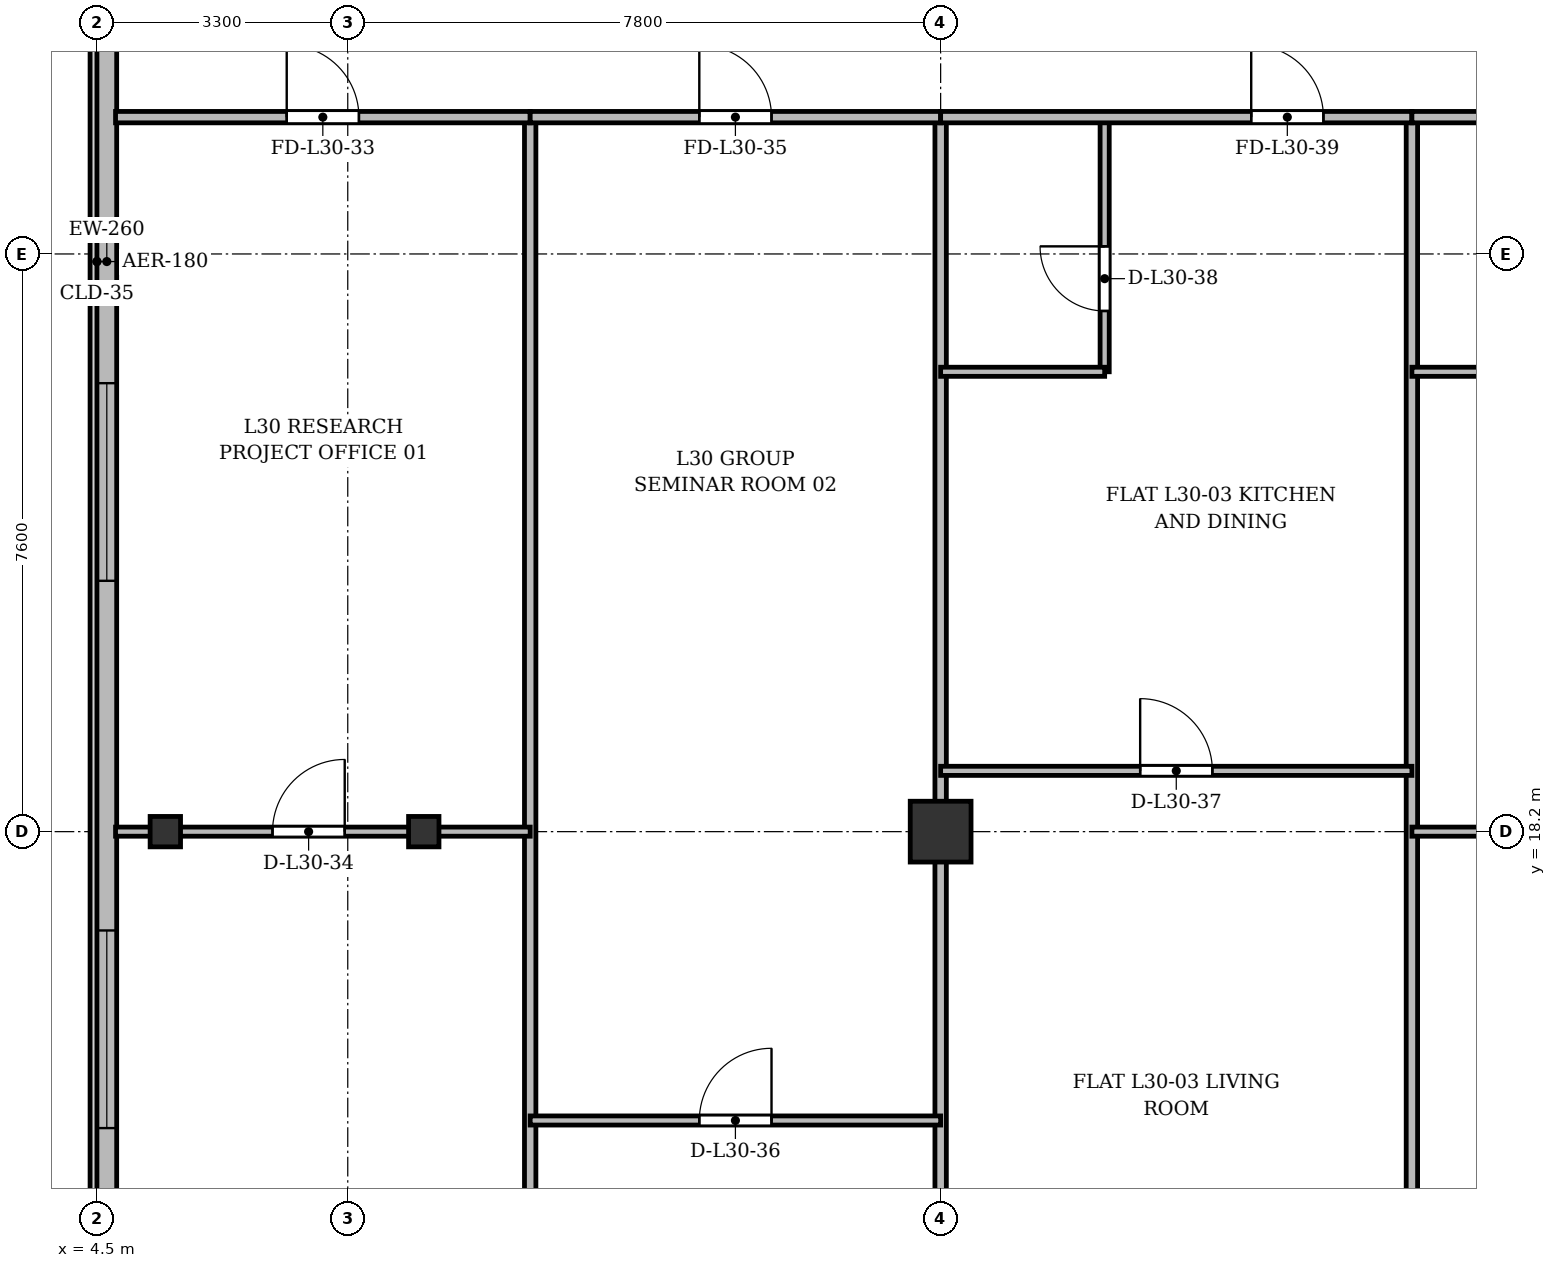
"""IFC4 building model, lengths in metres.
Left out: names, types, materials, properties, quantities, classifications, styles, units other than length and angle.
Written with IfcOpenShell. Run it as: python <this file> out.ifc"""

import sys

from ifc_helpers import new_model, si_unit, direction, frame, frame_2d, origin, origin_2d, place, context, subcontext, project, spatial, rectangle, i_section, extrude, source, transform, mapped, element, fill, save


model = new_model("IFC4")
c1 = context("Model", 3, precision=1e-05, world=origin(), true_north=direction((0.0, 1.0)))
c2 = subcontext(c1, "Body", "Model", "MODEL_VIEW")
j1 = project(units=[si_unit("LENGTHUNIT", "METRE"), si_unit("PLANEANGLEUNIT", "RADIAN")], contexts=[c1])
p1 = place(None, origin())
s1 = spatial("IfcSite", under=j1, at=p1, CompositionType="ELEMENT")
p2 = place(p1, origin())
s2 = spatial("IfcBuilding", under=s1, at=p2, CompositionType="ELEMENT")
p3 = place(p2, frame((0.0, 0.0, 117.7)))
s3 = spatial("IfcBuildingStorey", under=s2, at=p3, CompositionType="ELEMENT", Elevation=117.7)
m1 = source(origin(), c2, "Body", "SweptSolid", [
    extrude(i_section(OverallWidth=0.4, OverallDepth=0.4, WebThickness=0.022, FlangeThickness=0.035, at=origin_2d()), origin(), (0.0, 0.0, 1.0), 3.6),
])
for number, where, z_axis, x_axis in (
    (1, (5.4, 18.2, 0.0), (0.0, 0.0, 1.0), (1.0, 0.0, 0.0)),
    (2, (8.8, 18.2, 0.0), (0.0, 0.0, 1.0), (1.0, 0.0, 0.0)),
):
    element("IfcColumn", number, at=place(p3, frame(where, z_axis=z_axis, x_axis=x_axis)), inside=s3, PredefinedType="COLUMN", context=c2, shape_type="MappedRepresentation", body=[
        mapped(m1, transform((0.0, 0.0, 0.0), x_axis=(1.0, 0.0, 0.0), y_axis=(0.0, 1.0, 0.0), z_axis=(0.0, 0.0, 1.0), scale=1.0)),
    ])
m2 = source(origin(), c2, "Body", "SweptSolid", [
    extrude(rectangle(XDim=0.8, YDim=0.8, at=origin_2d()), origin(), (0.0, 0.0, 1.0), 3.6),
])
p4 = place(p3, frame((15.6, 18.2, 0.0), z_axis=(0.0, 0.0, 1.0), x_axis=(1.0, 0.0, 0.0)))
e3 = element("IfcColumn", 3, at=p4, inside=s3, PredefinedType="COLUMN", context=c2, shape_type="MappedRepresentation", body=[
    mapped(m2, transform((0.0, 0.0, 0.0), x_axis=(1.0, 0.0, 0.0), y_axis=(0.0, 1.0, 0.0), z_axis=(0.0, 0.0, 1.0), scale=1.0)),
])
p5 = place(p3, frame((4.63, 5.9, 0.0), z_axis=(0.0, 0.0, 1.0), x_axis=(0.0, 1.0, 0.0)))
e4 = element("IfcWall", 4, at=p5, inside=s3, PredefinedType="SOLIDWALL", context=c2, shape_type="SweptSolid", body=[
    extrude(rectangle(XDim=39.6, YDim=0.26, at=frame_2d((19.8, 0.0))), origin(), (0.0, 0.0, 1.0), 3.34),
])
p6 = place(p5, frame((1.45, 0.0, 0.92)))
e5 = element("IfcOpeningElement", 5, at=p6, cuts=e4, PredefinedType="OPENING", context=c2, shape_type="SweptSolid", body=[
    extrude(rectangle(XDim=1.2, YDim=1.65, at=frame_2d((0.6, 0.825))), frame((0.0, 0.14, 0.0), z_axis=(0.0, -1.0, 0.0), x_axis=(1.0, 0.0, 0.0)), (0.0, 0.0, 1.0), 0.28),
])
p7 = place(p5, frame((4.2, 0.0, 0.92)))
e6 = element("IfcOpeningElement", 6, at=p7, cuts=e4, PredefinedType="OPENING", context=c2, shape_type="SweptSolid", body=[
    extrude(rectangle(XDim=2.6, YDim=1.9, at=frame_2d((1.3, 0.95))), frame((0.0, 0.14, 0.0), z_axis=(0.0, -1.0, 0.0), x_axis=(1.0, 0.0, 0.0)), (0.0, 0.0, 1.0), 0.28),
])
p8 = place(p5, frame((8.4, 0.0, 0.92)))
e7 = element("IfcOpeningElement", 7, at=p8, cuts=e4, PredefinedType="OPENING", context=c2, shape_type="SweptSolid", body=[
    extrude(rectangle(XDim=2.6, YDim=1.9, at=frame_2d((1.3, 0.95))), frame((0.0, 0.14, 0.0), z_axis=(0.0, -1.0, 0.0), x_axis=(1.0, 0.0, 0.0)), (0.0, 0.0, 1.0), 0.28),
])
p9 = place(p5, frame((15.6, 0.0, 0.92)))
e8 = element("IfcOpeningElement", 8, at=p9, cuts=e4, PredefinedType="OPENING", context=c2, shape_type="SweptSolid", body=[
    extrude(rectangle(XDim=2.6, YDim=1.9, at=frame_2d((1.3, 0.95))), frame((0.0, 0.14, 0.0), z_axis=(0.0, -1.0, 0.0), x_axis=(1.0, 0.0, 0.0)), (0.0, 0.0, 1.0), 0.28),
])
p10 = place(p5, frame((33.9, 0.0, 0.92)))
e9 = element("IfcOpeningElement", 9, at=p10, cuts=e4, PredefinedType="OPENING", context=c2, shape_type="SweptSolid", body=[
    extrude(rectangle(XDim=1.2, YDim=1.65, at=frame_2d((0.6, 0.825))), frame((0.0, 0.14, 0.0), z_axis=(0.0, -1.0, 0.0), x_axis=(1.0, 0.0, 0.0)), (0.0, 0.0, 1.0), 0.28),
])
p11 = place(p5, frame((37.25, 0.0, 0.92)))
e10 = element("IfcOpeningElement", 10, at=p11, cuts=e4, PredefinedType="OPENING", context=c2, shape_type="SweptSolid", body=[
    extrude(rectangle(XDim=1.2, YDim=1.65, at=frame_2d((0.6, 0.825))), frame((0.0, 0.14, 0.0), z_axis=(0.0, -1.0, 0.0), x_axis=(1.0, 0.0, 0.0)), (0.0, 0.0, 1.0), 0.28),
])
p12 = place(p3, frame((10.2, 3.145, 0.0), z_axis=(0.0, 0.0, 1.0), x_axis=(0.0, 1.0, 0.0)))
e11 = element("IfcWall", 11, at=p12, inside=s3, PredefinedType="PARTITIONING", context=c2, shape_type="SweptSolid", body=[
    extrude(rectangle(XDim=24.455, YDim=0.15, at=frame_2d((12.228, 0.0))), origin(), (0.0, 0.0, 1.0), 2.752),
])
p13 = place(p3, frame((15.6, 3.145, 0.0), z_axis=(0.0, 0.0, 1.0), x_axis=(0.0, 1.0, 0.0)))
e12 = element("IfcWall", 12, at=p13, inside=s3, PredefinedType="PARTITIONING", context=c2, shape_type="SweptSolid", body=[
    extrude(rectangle(XDim=24.455, YDim=0.15, at=frame_2d((12.228, 0.0))), origin(), (0.0, 0.0, 1.0), 2.84),
])
p14 = place(p3, frame((21.8, 3.145, 0.0), z_axis=(0.0, 0.0, 1.0), x_axis=(0.0, 1.0, 0.0)))
e13 = element("IfcWall", 13, at=p14, inside=s3, PredefinedType="PARTITIONING", context=c2, shape_type="SweptSolid", body=[
    extrude(rectangle(XDim=24.455, YDim=0.15, at=frame_2d((12.228, 0.0))), origin(), (0.0, 0.0, 1.0), 2.752),
])
p15 = place(p3, frame((4.745, 27.6, 0.0), z_axis=(0.0, 0.0, 1.0), x_axis=(1.0, 0.0, 0.0)))
e14 = element("IfcWall", 14, at=p15, inside=s3, PredefinedType="PARTITIONING", context=c2, shape_type="SweptSolid", body=[
    extrude(rectangle(XDim=5.455, YDim=0.15, at=frame_2d((2.728, 0.0))), origin(), (0.0, 0.0, 1.0), 2.84),
])
p16 = place(p15, frame((2.252, 0.0, 0.0)))
e15 = element("IfcOpeningElement", 15, at=p16, cuts=e14, PredefinedType="OPENING", context=c2, shape_type="SweptSolid", body=[
    extrude(rectangle(XDim=0.95, YDim=2.15, at=frame_2d((0.475, 1.075))), frame((0.0, 0.085, 0.0), z_axis=(0.0, -1.0, 0.0), x_axis=(1.0, 0.0, 0.0)), (0.0, 0.0, 1.0), 0.17),
])
p17 = place(p3, frame((4.745, 18.2, 0.0), z_axis=(0.0, 0.0, 1.0), x_axis=(1.0, 0.0, 0.0)))
e16 = element("IfcWall", 16, at=p17, inside=s3, PredefinedType="PARTITIONING", context=c2, shape_type="SweptSolid", body=[
    extrude(rectangle(XDim=5.455, YDim=0.12, at=frame_2d((2.728, 0.0))), origin(), (0.0, 0.0, 1.0), 2.752),
])
p18 = place(p17, frame((2.065, 0.0, 0.0)))
e17 = element("IfcOpeningElement", 17, at=p18, cuts=e16, PredefinedType="OPENING", context=c2, shape_type="SweptSolid", body=[
    extrude(rectangle(XDim=0.95, YDim=2.15, at=frame_2d((0.475, 1.075))), frame((0.0, 0.07, 0.0), z_axis=(0.0, -1.0, 0.0), x_axis=(1.0, 0.0, 0.0)), (0.0, 0.0, 1.0), 0.14),
])
p19 = place(p3, frame((10.2, 27.6, 0.0), z_axis=(0.0, 0.0, 1.0), x_axis=(1.0, 0.0, 0.0)))
e18 = element("IfcWall", 18, at=p19, inside=s3, PredefinedType="PARTITIONING", context=c2, shape_type="SweptSolid", body=[
    extrude(rectangle(XDim=5.4, YDim=0.15, at=frame_2d((2.7, 0.0))), origin(), (0.0, 0.0, 1.0), 2.84),
])
p20 = place(p19, frame((2.225, 0.0, 0.0)))
e19 = element("IfcOpeningElement", 19, at=p20, cuts=e18, PredefinedType="OPENING", context=c2, shape_type="SweptSolid", body=[
    extrude(rectangle(XDim=0.95, YDim=2.15, at=frame_2d((0.475, 1.075))), frame((0.0, 0.085, 0.0), z_axis=(0.0, -1.0, 0.0), x_axis=(1.0, 0.0, 0.0)), (0.0, 0.0, 1.0), 0.17),
])
p21 = place(p3, frame((10.2, 14.4, 0.0), z_axis=(0.0, 0.0, 1.0), x_axis=(1.0, 0.0, 0.0)))
e20 = element("IfcWall", 20, at=p21, inside=s3, PredefinedType="PARTITIONING", context=c2, shape_type="SweptSolid", body=[
    extrude(rectangle(XDim=5.4, YDim=0.12, at=frame_2d((2.7, 0.0))), origin(), (0.0, 0.0, 1.0), 2.84),
])
p22 = place(p21, frame((2.225, 0.0, 0.0)))
e21 = element("IfcOpeningElement", 21, at=p22, cuts=e20, PredefinedType="OPENING", context=c2, shape_type="SweptSolid", body=[
    extrude(rectangle(XDim=0.95, YDim=2.15, at=frame_2d((0.475, 1.075))), frame((0.0, 0.07, 0.0), z_axis=(0.0, -1.0, 0.0), x_axis=(1.0, 0.0, 0.0)), (0.0, 0.0, 1.0), 0.14),
])
p23 = place(p3, frame((15.6, 19.0, 0.0), z_axis=(0.0, 0.0, 1.0), x_axis=(1.0, 0.0, 0.0)))
e22 = element("IfcWall", 22, at=p23, inside=s3, PredefinedType="PARTITIONING", context=c2, shape_type="SweptSolid", body=[
    extrude(rectangle(XDim=6.2, YDim=0.12, at=frame_2d((3.1, 0.0))), origin(), (0.0, 0.0, 1.0), 2.84),
])
p24 = place(p23, frame((2.625, 0.0, 0.0)))
e23 = element("IfcOpeningElement", 23, at=p24, cuts=e22, PredefinedType="OPENING", context=c2, shape_type="SweptSolid", body=[
    extrude(rectangle(XDim=0.95, YDim=2.15, at=frame_2d((0.475, 1.075))), frame((0.0, 0.07, 0.0), z_axis=(0.0, -1.0, 0.0), x_axis=(1.0, 0.0, 0.0)), (0.0, 0.0, 1.0), 0.14),
])
p25 = place(p3, frame((17.758, 24.25, 0.0), z_axis=(0.0, 0.0, 1.0), x_axis=(0.0, 1.0, 0.0)))
e24 = element("IfcWall", 24, at=p25, inside=s3, PredefinedType="PARTITIONING", context=c2, shape_type="SweptSolid", body=[
    extrude(rectangle(XDim=3.35, YDim=0.12, at=frame_2d((1.675, 0.0))), origin(), (0.0, 0.0, 1.0), 2.99),
])
p26 = place(p25, frame((0.8, 0.0, 0.0)))
e25 = element("IfcOpeningElement", 25, at=p26, cuts=e24, PredefinedType="OPENING", context=c2, shape_type="SweptSolid", body=[
    extrude(rectangle(XDim=0.85, YDim=2.1, at=frame_2d((0.425, 1.05))), frame((0.0, 0.07, 0.0), z_axis=(0.0, -1.0, 0.0), x_axis=(1.0, 0.0, 0.0)), (0.0, 0.0, 1.0), 0.14),
])
p27 = place(p3, frame((15.6, 24.25, 0.0), z_axis=(0.0, 0.0, 1.0), x_axis=(1.0, 0.0, 0.0)))
e26 = element("IfcWall", 26, at=p27, inside=s3, PredefinedType="PARTITIONING", context=c2, shape_type="SweptSolid", body=[
    extrude(rectangle(XDim=2.158, YDim=0.12, at=frame_2d((1.079, 0.0))), origin(), (0.0, 0.0, 1.0), 2.84),
])
p28 = place(p3, frame((15.6, 27.6, 0.0), z_axis=(0.0, 0.0, 1.0), x_axis=(1.0, 0.0, 0.0)))
e27 = element("IfcWall", 27, at=p28, inside=s3, PredefinedType="PARTITIONING", context=c2, shape_type="SweptSolid", body=[
    extrude(rectangle(XDim=6.2, YDim=0.15, at=frame_2d((3.1, 0.0))), origin(), (0.0, 0.0, 1.0), 2.84),
])
p29 = place(p28, frame((4.086, 0.0, 0.0)))
e28 = element("IfcOpeningElement", 28, at=p29, cuts=e27, PredefinedType="OPENING", context=c2, shape_type="SweptSolid", body=[
    extrude(rectangle(XDim=0.95, YDim=2.15, at=frame_2d((0.475, 1.075))), frame((0.0, 0.085, 0.0), z_axis=(0.0, -1.0, 0.0), x_axis=(1.0, 0.0, 0.0)), (0.0, 0.0, 1.0), 0.17),
])
p30 = place(p3, frame((21.8, 18.2, 0.0), z_axis=(0.0, 0.0, 1.0), x_axis=(1.0, 0.0, 0.0)))
e29 = element("IfcWall", 29, at=p30, inside=s3, PredefinedType="PARTITIONING", context=c2, shape_type="SweptSolid", body=[
    extrude(rectangle(XDim=6.0, YDim=0.12, at=frame_2d((3.0, 0.0))), origin(), (0.0, 0.0, 1.0), 2.752),
])
p31 = place(p30, frame((2.618, 0.0, 0.0)))
e30 = element("IfcOpeningElement", 30, at=p31, cuts=e29, PredefinedType="OPENING", context=c2, shape_type="SweptSolid", body=[
    extrude(rectangle(XDim=0.95, YDim=2.15, at=frame_2d((0.475, 1.075))), frame((0.0, 0.07, 0.0), z_axis=(0.0, -1.0, 0.0), x_axis=(1.0, 0.0, 0.0)), (0.0, 0.0, 1.0), 0.14),
])
p32 = place(p3, frame((21.8, 24.25, 0.0), z_axis=(0.0, 0.0, 1.0), x_axis=(1.0, 0.0, 0.0)))
e31 = element("IfcWall", 31, at=p32, inside=s3, PredefinedType="PARTITIONING", context=c2, shape_type="SweptSolid", body=[
    extrude(rectangle(XDim=2.09, YDim=0.12, at=frame_2d((1.045, 0.0))), origin(), (0.0, 0.0, 1.0), 2.84),
])
p33 = place(p3, frame((21.8, 27.6, 0.0), z_axis=(0.0, 0.0, 1.0), x_axis=(1.0, 0.0, 0.0)))
e32 = element("IfcWall", 32, at=p33, inside=s3, PredefinedType="PARTITIONING", context=c2, shape_type="SweptSolid", body=[
    extrude(rectangle(XDim=6.0, YDim=0.15, at=frame_2d((3.0, 0.0))), origin(), (0.0, 0.0, 1.0), 2.84),
])
p34 = place(p33, frame((3.865, 0.0, 0.0)))
e33 = element("IfcOpeningElement", 33, at=p34, cuts=e32, PredefinedType="OPENING", context=c2, shape_type="SweptSolid", body=[
    extrude(rectangle(XDim=0.95, YDim=2.15, at=frame_2d((0.475, 1.075))), frame((0.0, 0.085, 0.0), z_axis=(0.0, -1.0, 0.0), x_axis=(1.0, 0.0, 0.0)), (0.0, 0.0, 1.0), 0.17),
])
m3 = source(origin(), c2, "Body", "SweptSolid", [
    extrude(rectangle(XDim=2.6, YDim=1.9, at=frame_2d((1.3, 0.95))), frame((0.0, 0.03, 0.0), z_axis=(0.0, -1.0, 0.0), x_axis=(1.0, 0.0, 0.0)), (0.0, 0.0, 1.0), 0.06),
])
p35 = place(p8, origin())
e34 = element("IfcWindow", 34, at=p35, inside=s3, PartitioningType="SINGLE_PANEL", PredefinedType="WINDOW", context=c2, shape_type="MappedRepresentation", body=[
    mapped(m3, transform((0.0, 0.0, 0.0), x_axis=(1.0, 0.0, 0.0), y_axis=(0.0, 1.0, 0.0), z_axis=(0.0, 0.0, 1.0), scale=1.0)),
])
fill(e7, e34)
p36 = place(p9, origin())
e35 = element("IfcWindow", 35, at=p36, inside=s3, PartitioningType="SINGLE_PANEL", PredefinedType="WINDOW", context=c2, shape_type="MappedRepresentation", body=[
    mapped(m3, transform((0.0, 0.0, 0.0), x_axis=(1.0, 0.0, 0.0), y_axis=(0.0, 1.0, 0.0), z_axis=(0.0, 0.0, 1.0), scale=1.0)),
])
fill(e8, e35)
m4 = source(origin(), c2, "Body", "SweptSolid", [
    extrude(rectangle(XDim=0.95, YDim=2.15, at=frame_2d((0.475, 1.075))), frame((0.0, 0.025, 0.0), z_axis=(0.0, -1.0, 0.0), x_axis=(1.0, 0.0, 0.0)), (0.0, 0.0, 1.0), 0.05),
])
p37 = place(p16, origin())
e36 = element("IfcDoor", 36, at=p37, inside=s3, OperationType="SINGLE_SWING_LEFT", PredefinedType="DOOR", context=c2, shape_type="MappedRepresentation", body=[
    mapped(m4, transform((0.0, 0.0, 0.0), x_axis=(1.0, 0.0, 0.0), y_axis=(0.0, 1.0, 0.0), z_axis=(0.0, 0.0, 1.0), scale=1.0)),
])
fill(e15, e36)
p38 = place(p18, origin())
e37 = element("IfcDoor", 37, at=p38, inside=s3, OperationType="SINGLE_SWING_RIGHT", PredefinedType="DOOR", context=c2, shape_type="MappedRepresentation", body=[
    mapped(m4, transform((0.0, 0.0, 0.0), x_axis=(1.0, 0.0, 0.0), y_axis=(0.0, 1.0, 0.0), z_axis=(0.0, 0.0, 1.0), scale=1.0)),
])
fill(e17, e37)
p39 = place(p20, origin())
e38 = element("IfcDoor", 38, at=p39, inside=s3, OperationType="SINGLE_SWING_LEFT", PredefinedType="DOOR", context=c2, shape_type="MappedRepresentation", body=[
    mapped(m4, transform((0.0, 0.0, 0.0), x_axis=(1.0, 0.0, 0.0), y_axis=(0.0, 1.0, 0.0), z_axis=(0.0, 0.0, 1.0), scale=1.0)),
])
fill(e19, e38)
p40 = place(p22, origin())
e39 = element("IfcDoor", 39, at=p40, inside=s3, OperationType="SINGLE_SWING_RIGHT", PredefinedType="DOOR", context=c2, shape_type="MappedRepresentation", body=[
    mapped(m4, transform((0.0, 0.0, 0.0), x_axis=(1.0, 0.0, 0.0), y_axis=(0.0, 1.0, 0.0), z_axis=(0.0, 0.0, 1.0), scale=1.0)),
])
fill(e21, e39)
p41 = place(p24, origin())
e40 = element("IfcDoor", 40, at=p41, inside=s3, OperationType="SINGLE_SWING_LEFT", PredefinedType="DOOR", context=c2, shape_type="MappedRepresentation", body=[
    mapped(m4, transform((0.0, 0.0, 0.0), x_axis=(1.0, 0.0, 0.0), y_axis=(0.0, 1.0, 0.0), z_axis=(0.0, 0.0, 1.0), scale=1.0)),
])
fill(e23, e40)
m5 = source(origin(), c2, "Body", "SweptSolid", [
    extrude(rectangle(XDim=0.85, YDim=2.1, at=frame_2d((0.425, 1.05))), frame((0.0, 0.025, 0.0), z_axis=(0.0, -1.0, 0.0), x_axis=(1.0, 0.0, 0.0)), (0.0, 0.0, 1.0), 0.05),
])
p42 = place(p26, origin())
e41 = element("IfcDoor", 41, at=p42, inside=s3, OperationType="SINGLE_SWING_RIGHT", PredefinedType="DOOR", context=c2, shape_type="MappedRepresentation", body=[
    mapped(m5, transform((0.0, 0.0, 0.0), x_axis=(1.0, 0.0, 0.0), y_axis=(0.0, 1.0, 0.0), z_axis=(0.0, 0.0, 1.0), scale=1.0)),
])
fill(e25, e41)
p43 = place(p29, origin())
e42 = element("IfcDoor", 42, at=p43, inside=s3, OperationType="SINGLE_SWING_LEFT", PredefinedType="DOOR", context=c2, shape_type="MappedRepresentation", body=[
    mapped(m4, transform((0.0, 0.0, 0.0), x_axis=(1.0, 0.0, 0.0), y_axis=(0.0, 1.0, 0.0), z_axis=(0.0, 0.0, 1.0), scale=1.0)),
])
fill(e28, e42)
save(model, sys.argv[1])
